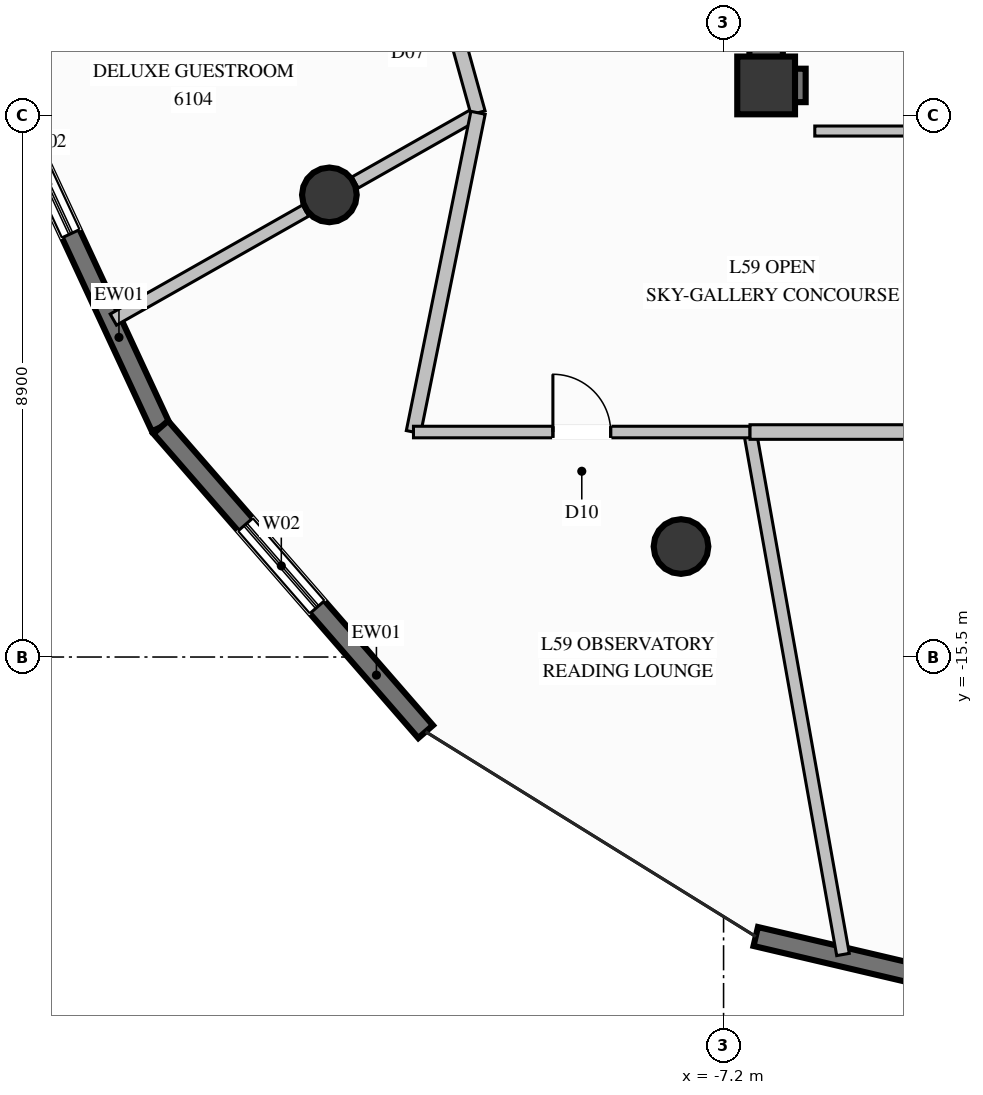
"""IFC4 building model, lengths in metres.
Left out: names, types, materials, properties, quantities, classifications, styles, units other than length and angle.
Written with IfcOpenShell. Run it as: python <this file> out.ifc"""

import sys

from ifc_helpers import new_model, si_unit, direction, frame, frame_2d, origin, origin_2d, place, context, subcontext, project, spatial, rectangle, circle, extrude, element, fill, save


model = new_model("IFC4")
c1 = context("Model", 3, precision=1e-05, world=origin(), true_north=direction((0.0, 1.0)))
c2 = subcontext(c1, "Body", "Model", "MODEL_VIEW")
j1 = project(units=[si_unit("LENGTHUNIT", "METRE"), si_unit("PLANEANGLEUNIT", "RADIAN")], contexts=[c1])
p1 = place(None, origin())
s1 = spatial("IfcSite", under=j1, at=p1, CompositionType="ELEMENT")
p2 = place(p1, origin())
s2 = spatial("IfcBuilding", under=s1, at=p2, CompositionType="ELEMENT")
p3 = place(p2, frame((0.0, 0.0, 227.2)))
s3 = spatial("IfcBuildingStorey", under=s2, at=p3, CompositionType="ELEMENT", Elevation=227.2)
p4 = place(p3, frame((-6.5, -6.1, 0.0), z_axis=(0.0, 0.0, 1.0), x_axis=(1.0, 0.0, 0.0)))
e1 = element("IfcColumn", 1, at=p4, inside=s3, PredefinedType="COLUMN", context=c2, shape_type="SweptSolid", body=[
    extrude(rectangle(XDim=0.95, YDim=0.95, at=origin_2d()), origin(), (0.0, 0.0, 1.0), 3.6),
])
p5 = place(p3, frame((-6.225, -6.1, 0.0), z_axis=(0.0, 0.0, 1.0), x_axis=(1.0, 0.0, 0.0)))
e2 = element("IfcWall", 2, at=p5, inside=s3, PredefinedType="SHEAR", context=c2, shape_type="SweptSolid", body=[
    extrude(rectangle(XDim=0.375, YDim=0.55, at=frame_2d((0.188, 0.0))), origin(), (0.0, 0.0, 1.0), 3.6),
])
p6 = place(p3, frame((-6.5, -6.375, 0.0), z_axis=(0.0, 0.0, 1.0), x_axis=(0.0, 1.0, 0.0)))
e3 = element("IfcWall", 3, at=p6, inside=s3, PredefinedType="SHEAR", context=c2, shape_type="SweptSolid", body=[
    extrude(rectangle(XDim=3.025, YDim=0.55, at=frame_2d((1.512, 0.0))), origin(), (0.0, 0.0, 1.0), 3.6),
])
for number, where, z_axis, x_axis in (
    (4, (-13.683, -7.9, 0.0), (0.0, 0.0, 1.0), (1.0, 0.0, 0.0)),
    (5, (-7.9, -13.683, 0.0), (0.0, 0.0, 1.0), (1.0, 0.0, 0.0)),
):
    element("IfcColumn", number, at=place(p3, frame(where, z_axis=z_axis, x_axis=x_axis)), inside=s3, PredefinedType="COLUMN", context=c2, shape_type="SweptSolid", body=[
        extrude(circle(Radius=0.45, at=origin_2d()), origin(), (0.0, 0.0, 1.0), 3.6),
    ])
p7 = place(p3, frame((-16.457, -11.721, 0.0), z_axis=(0.0, 0.0, 1.0), x_axis=(-0.421379832148, 0.906884246781, 0.0)))
e6 = element("IfcWall", 6, at=p7, inside=s3, PredefinedType="SOLIDWALL", context=c2, shape_type="SweptSolid", body=[
    extrude(rectangle(XDim=6.785, YDim=0.32, at=frame_2d((3.392, 0.0))), origin(), (0.0, 0.0, 1.0), 3.36),
])
p8 = place(p7, frame((3.509, 0.0, 0.35)))
e7 = element("IfcOpeningElement", 7, at=p8, cuts=e6, PredefinedType="OPENING", context=c2, shape_type="SweptSolid", body=[
    extrude(rectangle(XDim=1.8, YDim=2.6, at=frame_2d((0.9, 1.3))), frame((0.0, 0.17, 0.0), z_axis=(0.0, -1.0, 0.0), x_axis=(1.0, 0.0, 0.0)), (0.0, 0.0, 1.0), 0.34),
])
p9 = place(p3, frame((-12.1, -16.728, 0.0), z_axis=(0.0, 0.0, 1.0), x_axis=(-0.656431844165, 0.754385335201, 0.0)))
e8 = element("IfcWall", 8, at=p9, inside=s3, PredefinedType="SOLIDWALL", context=c2, shape_type="SweptSolid", body=[
    extrude(rectangle(XDim=6.637, YDim=0.32, at=frame_2d((3.319, 0.0))), origin(), (0.0, 0.0, 1.0), 3.36),
])
p10 = place(p9, frame((2.716, 0.0, 0.35)))
e9 = element("IfcOpeningElement", 9, at=p10, cuts=e8, PredefinedType="OPENING", context=c2, shape_type="SweptSolid", body=[
    extrude(rectangle(XDim=1.8, YDim=2.6, at=frame_2d((0.9, 1.3))), frame((0.0, 0.17, 0.0), z_axis=(0.0, -1.0, 0.0), x_axis=(1.0, 0.0, 0.0)), (0.0, 0.0, 1.0), 0.34),
])
p11 = place(p3, frame((-0.702, -21.498, 0.0), z_axis=(0.0, 0.0, 1.0), x_axis=(-0.973503262374, 0.22867312511, 0.0)))
e10 = element("IfcWall", 10, at=p11, inside=s3, PredefinedType="SOLIDWALL", context=c2, shape_type="SweptSolid", body=[
    extrude(rectangle(XDim=6.131, YDim=0.32, at=frame_2d((3.066, 0.0))), origin(), (0.0, 0.0, 1.0), 3.36),
])
p12 = place(p11, frame((1.383, 0.0, 0.35)))
e11 = element("IfcOpeningElement", 11, at=p12, cuts=e10, PredefinedType="OPENING", context=c2, shape_type="SweptSolid", body=[
    extrude(rectangle(XDim=1.8, YDim=2.6, at=frame_2d((0.9, 1.3))), frame((0.0, 0.17, 0.0), z_axis=(0.0, -1.0, 0.0), x_axis=(1.0, 0.0, 0.0)), (0.0, 0.0, 1.0), 0.34),
])
p13 = place(p3, frame((-5.7, -6.85, 0.0), z_axis=(0.0, 0.0, 1.0), x_axis=(1.0, 0.0, 0.0)))
e12 = element("IfcWall", 12, at=p13, inside=s3, PredefinedType="PARTITIONING", context=c2, shape_type="SweptSolid", body=[
    extrude(rectangle(XDim=6.55, YDim=0.165, at=frame_2d((3.275, 0.0))), origin(), (0.0, 0.0, 1.0), 2.445),
])
p14 = place(p13, frame((2.8, 0.0, 0.0)))
e13 = element("IfcOpeningElement", 13, at=p14, cuts=e12, PredefinedType="OPENING", context=c2, shape_type="SweptSolid", body=[
    extrude(rectangle(XDim=0.95, YDim=2.1, at=frame_2d((0.475, 1.05))), frame((0.0, 0.093, 0.0), z_axis=(0.0, -1.0, 0.0), x_axis=(1.0, 0.0, 0.0)), (0.0, 0.0, 1.0), 0.185),
])
p15 = place(p3, frame((-11.238, -6.55, 0.0), z_axis=(0.0, 0.0, 1.0), x_axis=(-0.869880919388, -0.493261782509, 0.0)))
e14 = element("IfcWall", 14, at=p15, inside=s3, PredefinedType="PARTITIONING", context=c2, shape_type="SweptSolid", body=[
    extrude(rectangle(XDim=2.323, YDim=0.21, at=frame_2d((1.162, 0.0))), origin(), (0.0, 0.0, 1.0), 2.876),
])
p16 = place(p3, frame((-14.075, -8.159, 0.0), z_axis=(0.0, 0.0, 1.0), x_axis=(-0.869941481597, -0.493154964081, 0.0)))
e15 = element("IfcWall", 15, at=p16, inside=s3, PredefinedType="PARTITIONING", context=c2, shape_type="SweptSolid", body=[
    extrude(rectangle(XDim=3.634, YDim=0.21, at=frame_2d((1.817, 0.0))), origin(), (0.0, 0.0, 1.0), 3.36),
])
p17 = place(p3, frame((-12.26, -2.867, 0.0), z_axis=(0.0, 0.0, 1.0), x_axis=(0.267373718537, -0.963592909187, 0.0)))
e16 = element("IfcWall", 16, at=p17, inside=s3, PredefinedType="PARTITIONING", context=c2, shape_type="SweptSolid", body=[
    extrude(rectangle(XDim=3.822, YDim=0.24, at=frame_2d((1.911, 0.0))), origin(), (0.0, 0.0, 1.0), 3.36),
])
p18 = place(p17, frame((1.411, 0.0, 0.0)))
e17 = element("IfcOpeningElement", 17, at=p18, cuts=e16, PredefinedType="OPENING", context=c2, shape_type="SweptSolid", body=[
    extrude(rectangle(XDim=1.0, YDim=2.2, at=frame_2d((0.5, 1.1))), frame((0.0, 0.13, 0.0), z_axis=(0.0, -1.0, 0.0), x_axis=(1.0, 0.0, 0.0)), (0.0, 0.0, 1.0), 0.26),
])
p19 = place(p3, frame((-6.765, -11.8, 0.0), z_axis=(0.0, 0.0, 1.0), x_axis=(0.17518157927, -0.984536141685, 0.0)))
e18 = element("IfcWall", 18, at=p19, inside=s3, PredefinedType="PARTITIONING", context=c2, shape_type="SweptSolid", body=[
    extrude(rectangle(XDim=8.727, YDim=0.21, at=frame_2d((4.364, 0.0))), origin(), (0.0, 0.0, 1.0), 3.36),
])
p20 = place(p3, frame((-11.238, -6.55, 0.0), z_axis=(0.0, 0.0, 1.0), x_axis=(-0.198271934001, -0.980147050288, 0.0)))
e19 = element("IfcWall", 19, at=p20, inside=s3, PredefinedType="PARTITIONING", context=c2, shape_type="SweptSolid", body=[
    extrude(rectangle(XDim=5.356, YDim=0.24, at=frame_2d((2.678, 0.0))), origin(), (0.0, 0.0, 1.0), 3.36),
])
p21 = place(p3, frame((-12.3, -11.8, 0.0), z_axis=(0.0, 0.0, 1.0), x_axis=(1.0, 0.0, 0.0)))
e20 = element("IfcWall", 20, at=p21, inside=s3, PredefinedType="PARTITIONING", context=c2, shape_type="SweptSolid", body=[
    extrude(rectangle(XDim=5.535, YDim=0.19, at=frame_2d((2.768, 0.0))), origin(), (0.0, 0.0, 1.0), 3.36),
])
p22 = place(p21, frame((2.293, 0.0, 0.0)))
e21 = element("IfcOpeningElement", 21, at=p22, cuts=e20, PredefinedType="OPENING", context=c2, shape_type="SweptSolid", body=[
    extrude(rectangle(XDim=0.95, YDim=2.1, at=frame_2d((0.475, 1.05))), frame((0.0, 0.105, 0.0), z_axis=(0.0, -1.0, 0.0), x_axis=(1.0, 0.0, 0.0)), (0.0, 0.0, 1.0), 0.21),
])
p23 = place(p3, frame((-6.765, -11.8, 0.0), z_axis=(0.0, 0.0, 1.0), x_axis=(1.0, 0.0, 0.0)))
e22 = element("IfcWall", 22, at=p23, inside=s3, PredefinedType="PARTITIONING", context=c2, shape_type="SweptSolid", body=[
    extrude(rectangle(XDim=6.765, YDim=0.24, at=frame_2d((3.382, 0.0))), origin(), (0.0, 0.0, 1.0), 3.36),
])
p24 = place(p8, origin())
e23 = element("IfcWindow", 23, at=p24, inside=s3, PartitioningType="SINGLE_PANEL", PredefinedType="WINDOW", context=c2, shape_type="SweptSolid", body=[
    extrude(rectangle(XDim=1.8, YDim=2.6, at=frame_2d((0.9, 1.3))), frame((0.0, 0.03, 0.0), z_axis=(0.0, -1.0, 0.0), x_axis=(1.0, 0.0, 0.0)), (0.0, 0.0, 1.0), 0.06),
])
fill(e7, e23)
p25 = place(p10, origin())
e24 = element("IfcWindow", 24, at=p25, inside=s3, PartitioningType="SINGLE_PANEL", PredefinedType="WINDOW", context=c2, shape_type="SweptSolid", body=[
    extrude(rectangle(XDim=1.8, YDim=2.6, at=frame_2d((0.9, 1.3))), frame((0.0, 0.03, 0.0), z_axis=(0.0, -1.0, 0.0), x_axis=(1.0, 0.0, 0.0)), (0.0, 0.0, 1.0), 0.06),
])
fill(e9, e24)
p26 = place(p22, origin())
e25 = element("IfcDoor", 25, at=p26, inside=s3, OperationType="SINGLE_SWING_LEFT", PredefinedType="DOOR", context=c2, shape_type="SweptSolid", body=[
    extrude(rectangle(XDim=0.95, YDim=2.1, at=frame_2d((0.475, 1.05))), frame((0.0, 0.025, 0.0), z_axis=(0.0, -1.0, 0.0), x_axis=(1.0, 0.0, 0.0)), (0.0, 0.0, 1.0), 0.05),
])
fill(e21, e25)
save(model, sys.argv[1])
